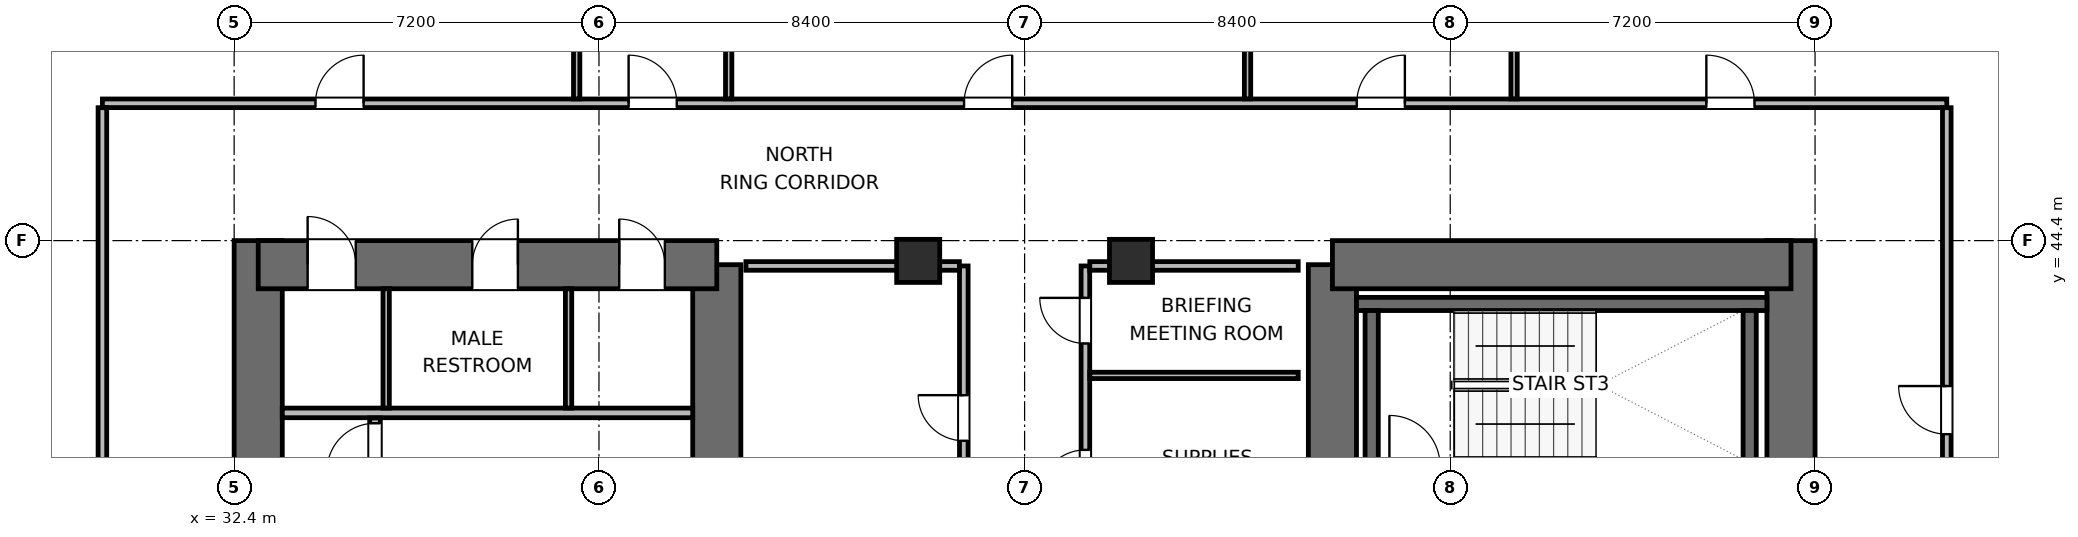
"""IFC4 building model, lengths in metres.
Left out: names, types, materials, properties, quantities, classifications, styles, units other than length and angle.
Written with IfcOpenShell. Run it as: python <this file> out.ifc"""

import sys

from ifc_helpers import new_model, si_unit, direction, frame, frame_2d, origin, origin_2d, place, context, subcontext, project, spatial, rectangle, extrude, element, fill, save


model = new_model("IFC4")
c1 = context("Model", 3, precision=1e-05, world=origin(), true_north=direction((0.0, 1.0)))
c2 = subcontext(c1, "Body", "Model", "MODEL_VIEW")
j1 = project(units=[si_unit("LENGTHUNIT", "METRE"), si_unit("PLANEANGLEUNIT", "RADIAN")], contexts=[c1])
p1 = place(None, origin())
s1 = spatial("IfcSite", under=j1, at=p1, CompositionType="ELEMENT")
p2 = place(p1, origin())
s2 = spatial("IfcBuilding", under=s1, at=p2, CompositionType="ELEMENT")
p3 = place(p2, frame((0.0, 0.0, 45.0)))
s3 = spatial("IfcBuildingStorey", under=s2, at=p3, CompositionType="ELEMENT", Elevation=45.0)
p4 = place(p3, frame((32.875, 27.6, 0.0), z_axis=(0.0, 0.0, 1.0), x_axis=(0.0, 1.0, 0.0)))
e1 = element("IfcWall", 1, at=p4, inside=s3, PredefinedType="SHEAR", context=c2, shape_type="SweptSolid", body=[
    extrude(rectangle(XDim=16.8, YDim=0.95, at=frame_2d((8.4, 0.0))), origin(), (0.0, 0.0, 1.0), 3.9),
])
p5 = place(p3, frame((41.925, 37.8, 0.0), z_axis=(0.0, 0.0, 1.0), x_axis=(0.0, 1.0, 0.0)))
e2 = element("IfcWall", 2, at=p5, inside=s3, PredefinedType="SHEAR", context=c2, shape_type="SweptSolid", body=[
    extrude(rectangle(XDim=6.125, YDim=0.95, at=frame_2d((3.062, 0.0))), origin(), (0.0, 0.0, 1.0), 3.9),
])
p6 = place(p3, frame((32.875, 43.925, 0.0), z_axis=(0.0, 0.0, 1.0), x_axis=(1.0, 0.0, 0.0)))
e3 = element("IfcWall", 3, at=p6, inside=s3, PredefinedType="SHEAR", context=c2, shape_type="SweptSolid", body=[
    extrude(rectangle(XDim=9.05, YDim=0.95, at=frame_2d((4.525, 0.0))), origin(), (0.0, 0.0, 1.0), 3.9),
])
p7 = place(p6, frame((0.975, 0.0, 0.0)))
e4 = element("IfcOpeningElement", 4, at=p7, cuts=e3, PredefinedType="OPENING", context=c2, shape_type="SweptSolid", body=[
    extrude(rectangle(XDim=0.95, YDim=2.04, at=frame_2d((0.475, 1.02))), frame((0.0, 0.485, 0.0), z_axis=(0.0, -1.0, 0.0), x_axis=(1.0, 0.0, 0.0)), (0.0, 0.0, 1.0), 0.97),
])
p8 = place(p6, frame((4.225, 0.0, 0.0)))
e5 = element("IfcOpeningElement", 5, at=p8, cuts=e3, PredefinedType="OPENING", context=c2, shape_type="SweptSolid", body=[
    extrude(rectangle(XDim=0.9, YDim=2.02, at=frame_2d((0.45, 1.01))), frame((0.0, 0.485, 0.0), z_axis=(0.0, -1.0, 0.0), x_axis=(1.0, 0.0, 0.0)), (0.0, 0.0, 1.0), 0.97),
])
p9 = place(p6, frame((7.125, 0.0, 0.0)))
e6 = element("IfcOpeningElement", 6, at=p9, cuts=e3, PredefinedType="OPENING", context=c2, shape_type="SweptSolid", body=[
    extrude(rectangle(XDim=0.9, YDim=2.02, at=frame_2d((0.45, 1.01))), frame((0.0, 0.485, 0.0), z_axis=(0.0, -1.0, 0.0), x_axis=(1.0, 0.0, 0.0)), (0.0, 0.0, 1.0), 0.97),
])
p10 = place(p3, frame((54.075, 38.0, 0.0), z_axis=(0.0, 0.0, 1.0), x_axis=(0.0, 1.0, 0.0)))
e7 = element("IfcWall", 7, at=p10, inside=s3, PredefinedType="SHEAR", context=c2, shape_type="SweptSolid", body=[
    extrude(rectangle(XDim=5.925, YDim=0.95, at=frame_2d((2.962, 0.0))), origin(), (0.0, 0.0, 1.0), 3.9),
])
p11 = place(p3, frame((63.125, 27.6, 0.0), z_axis=(0.0, 0.0, 1.0), x_axis=(0.0, 1.0, 0.0)))
e8 = element("IfcWall", 8, at=p11, inside=s3, PredefinedType="SHEAR", context=c2, shape_type="SweptSolid", body=[
    extrude(rectangle(XDim=16.8, YDim=0.95, at=frame_2d((8.4, 0.0))), origin(), (0.0, 0.0, 1.0), 3.9),
])
p12 = place(p3, frame((54.075, 43.925, 0.0), z_axis=(0.0, 0.0, 1.0), x_axis=(1.0, 0.0, 0.0)))
e9 = element("IfcWall", 9, at=p12, inside=s3, PredefinedType="SHEAR", context=c2, shape_type="SweptSolid", body=[
    extrude(rectangle(XDim=9.05, YDim=0.95, at=frame_2d((4.525, 0.0))), origin(), (0.0, 0.0, 1.0), 3.9),
])
p13 = place(p3, frame((54.55, 43.15, 0.0), z_axis=(0.0, 0.0, 1.0), x_axis=(1.0, 0.0, 0.0)))
e10 = element("IfcWall", 10, at=p13, inside=s3, PredefinedType="SHEAR", context=c2, shape_type="SweptSolid", body=[
    extrude(rectangle(XDim=8.1, YDim=0.26, at=frame_2d((4.05, 0.0))), origin(), (0.0, 0.0, 1.0), 3.9),
])
for number, where, z_axis, x_axis in (
    (11, (54.85, 40.08, 0.0), (0.0, 0.0, 1.0), (0.0, 1.0, 0.0)),
    (12, (62.31, 40.08, 0.0), (0.0, 0.0, 1.0), (0.0, 1.0, 0.0)),
):
    element("IfcWall", number, at=place(p3, frame(where, z_axis=z_axis, x_axis=x_axis)), inside=s3, PredefinedType="SHEAR", context=c2, shape_type="SweptSolid", body=[
        extrude(rectangle(XDim=2.94, YDim=0.26, at=frame_2d((1.47, 0.0))), origin(), (0.0, 0.0, 1.0), 3.9),
    ])
for number, where, z_axis, x_axis in (
    (13, (45.9, 44.0, 0.0), (0.0, 0.0, 1.0), (1.0, 0.0, 0.0)),
    (14, (50.1, 44.0, 0.0), (0.0, 0.0, 1.0), (1.0, 0.0, 0.0)),
):
    element("IfcColumn", number, at=place(p3, frame(where, z_axis=z_axis, x_axis=x_axis)), inside=s3, PredefinedType="COLUMN", context=c2, shape_type="SweptSolid", body=[
        extrude(rectangle(XDim=0.85, YDim=0.85, at=origin_2d()), origin(), (0.0, 0.0, 1.0), 3.9),
    ])
p14 = place(p3, frame((33.35, 41.0, 0.0), z_axis=(0.0, 0.0, 1.0), x_axis=(1.0, 0.0, 0.0)))
e15 = element("IfcWall", 15, at=p14, inside=s3, PredefinedType="PLUMBINGWALL", context=c2, shape_type="SweptSolid", body=[
    extrude(rectangle(XDim=8.1, YDim=0.19, at=frame_2d((4.05, 0.0))), origin(), (0.0, 0.0, 1.0), 3.64),
])
for number, where, z_axis, x_axis in (
    (16, (35.4, 41.095, 0.0), (0.0, 0.0, 1.0), (0.0, 1.0, 0.0)),
    (17, (39.0, 41.095, 0.0), (0.0, 0.0, 1.0), (0.0, 1.0, 0.0)),
):
    element("IfcWall", number, at=place(p3, frame(where, z_axis=z_axis, x_axis=x_axis)), inside=s3, PredefinedType="PARTITIONING", context=c2, shape_type="SweptSolid", body=[
        extrude(rectangle(XDim=2.355, YDim=0.125, at=frame_2d((1.177, 0.0))), origin(), (0.0, 0.0, 1.0), 3.64),
    ])
p15 = place(p3, frame((35.18, 39.74, 0.0), z_axis=(0.0, 0.0, 1.0), x_axis=(0.0, 1.0, 0.0)))
e18 = element("IfcWall", 18, at=p15, inside=s3, PredefinedType="PARTITIONING", context=c2, shape_type="SweptSolid", body=[
    extrude(rectangle(XDim=1.16, YDim=0.21, at=frame_2d((0.58, 0.0))), origin(), (0.0, 0.0, 1.0), 3.64),
])
p16 = place(p15, frame((0.105, 0.0, 0.0)))
e19 = element("IfcOpeningElement", 19, at=p16, cuts=e18, PredefinedType="OPENING", context=c2, shape_type="SweptSolid", body=[
    extrude(rectangle(XDim=0.95, YDim=2.04, at=frame_2d((0.475, 1.02))), frame((0.0, 0.115, 0.0), z_axis=(0.0, -1.0, 0.0), x_axis=(1.0, 0.0, 0.0)), (0.0, 0.0, 1.0), 0.23),
])
p17 = place(p3, frame((46.8, 37.9, 0.0), z_axis=(0.0, 0.0, 1.0), x_axis=(0.0, 1.0, 0.0)))
e20 = element("IfcWall", 20, at=p17, inside=s3, PredefinedType="PARTITIONING", context=c2, shape_type="SweptSolid", body=[
    extrude(rectangle(XDim=6.0, YDim=0.17, at=frame_2d((3.0, 0.0))), origin(), (0.0, 0.0, 1.0), 3.64),
])
p18 = place(p17, frame((2.55, 0.0, 0.0)))
e21 = element("IfcOpeningElement", 21, at=p18, cuts=e20, PredefinedType="OPENING", context=c2, shape_type="SweptSolid", body=[
    extrude(rectangle(XDim=0.9, YDim=2.02, at=frame_2d((0.45, 1.01))), frame((0.0, 0.095, 0.0), z_axis=(0.0, -1.0, 0.0), x_axis=(1.0, 0.0, 0.0)), (0.0, 0.0, 1.0), 0.19),
])
p19 = place(p3, frame((42.5, 43.9, 0.0), z_axis=(0.0, 0.0, 1.0), x_axis=(1.0, 0.0, 0.0)))
e22 = element("IfcWall", 22, at=p19, inside=s3, PredefinedType="PARTITIONING", context=c2, shape_type="SweptSolid", body=[
    extrude(rectangle(XDim=4.213, YDim=0.17, at=frame_2d((2.106, 0.0))), origin(), (0.0, 0.0, 1.0), 2.525),
])
p20 = place(p3, frame((49.2, 37.9, 0.0), z_axis=(0.0, 0.0, 1.0), x_axis=(0.0, 1.0, 0.0)))
e23 = element("IfcWall", 23, at=p20, inside=s3, PredefinedType="PARTITIONING", context=c2, shape_type="SweptSolid", body=[
    extrude(rectangle(XDim=6.0, YDim=0.17, at=frame_2d((3.0, 0.0))), origin(), (0.0, 0.0, 1.0), 3.64),
])
p21 = place(p20, frame((1.47, 0.0, 0.0)))
e24 = element("IfcOpeningElement", 24, at=p21, cuts=e23, PredefinedType="OPENING", context=c2, shape_type="SweptSolid", body=[
    extrude(rectangle(XDim=0.9, YDim=2.02, at=frame_2d((0.45, 1.01))), frame((0.0, 0.095, 0.0), z_axis=(0.0, -1.0, 0.0), x_axis=(1.0, 0.0, 0.0)), (0.0, 0.0, 1.0), 0.19),
])
p22 = place(p20, frame((4.47, 0.0, 0.0)))
e25 = element("IfcOpeningElement", 25, at=p22, cuts=e23, PredefinedType="OPENING", context=c2, shape_type="SweptSolid", body=[
    extrude(rectangle(XDim=0.9, YDim=2.02, at=frame_2d((0.45, 1.01))), frame((0.0, 0.095, 0.0), z_axis=(0.0, -1.0, 0.0), x_axis=(1.0, 0.0, 0.0)), (0.0, 0.0, 1.0), 0.19),
])
p23 = place(p3, frame((49.287, 43.9, 0.0), z_axis=(0.0, 0.0, 1.0), x_axis=(1.0, 0.0, 0.0)))
e26 = element("IfcWall", 26, at=p23, inside=s3, PredefinedType="PARTITIONING", context=c2, shape_type="SweptSolid", body=[
    extrude(rectangle(XDim=4.113, YDim=0.17, at=frame_2d((2.056, 0.0))), origin(), (0.0, 0.0, 1.0), 2.525),
])
p24 = place(p3, frame((49.287, 41.74, 0.0), z_axis=(0.0, 0.0, 1.0), x_axis=(1.0, 0.0, 0.0)))
e27 = element("IfcWall", 27, at=p24, inside=s3, PredefinedType="PARTITIONING", context=c2, shape_type="SweptSolid", body=[
    extrude(rectangle(XDim=4.113, YDim=0.125, at=frame_2d((2.056, 0.0))), origin(), (0.0, 0.0, 1.0), 3.64),
])
p25 = place(p3, frame((29.8, 47.11, 0.0), z_axis=(0.0, 0.0, 1.0), x_axis=(1.0, 0.0, 0.0)))
e28 = element("IfcWall", 28, at=p25, inside=s3, PredefinedType="PARTITIONING", context=c2, shape_type="SweptSolid", body=[
    extrude(rectangle(XDim=36.4, YDim=0.17, at=frame_2d((18.2, 0.0))), origin(), (0.0, 0.0, 1.0), 3.64),
])
p26 = place(p25, frame((4.205, 0.0, 0.0)))
e29 = element("IfcOpeningElement", 29, at=p26, cuts=e28, PredefinedType="OPENING", context=c2, shape_type="SweptSolid", body=[
    extrude(rectangle(XDim=0.95, YDim=2.04, at=frame_2d((0.475, 1.02))), frame((0.0, 0.095, 0.0), z_axis=(0.0, -1.0, 0.0), x_axis=(1.0, 0.0, 0.0)), (0.0, 0.0, 1.0), 0.19),
])
p27 = place(p25, frame((10.385, 0.0, 0.0)))
e30 = element("IfcOpeningElement", 30, at=p27, cuts=e28, PredefinedType="OPENING", context=c2, shape_type="SweptSolid", body=[
    extrude(rectangle(XDim=0.95, YDim=2.04, at=frame_2d((0.475, 1.02))), frame((0.0, 0.095, 0.0), z_axis=(0.0, -1.0, 0.0), x_axis=(1.0, 0.0, 0.0)), (0.0, 0.0, 1.0), 0.19),
])
p28 = place(p25, frame((17.005, 0.0, 0.0)))
e31 = element("IfcOpeningElement", 31, at=p28, cuts=e28, PredefinedType="OPENING", context=c2, shape_type="SweptSolid", body=[
    extrude(rectangle(XDim=0.95, YDim=2.04, at=frame_2d((0.475, 1.02))), frame((0.0, 0.095, 0.0), z_axis=(0.0, -1.0, 0.0), x_axis=(1.0, 0.0, 0.0)), (0.0, 0.0, 1.0), 0.19),
])
p29 = place(p25, frame((24.755, 0.0, 0.0)))
e32 = element("IfcOpeningElement", 32, at=p29, cuts=e28, PredefinedType="OPENING", context=c2, shape_type="SweptSolid", body=[
    extrude(rectangle(XDim=0.95, YDim=2.04, at=frame_2d((0.475, 1.02))), frame((0.0, 0.095, 0.0), z_axis=(0.0, -1.0, 0.0), x_axis=(1.0, 0.0, 0.0)), (0.0, 0.0, 1.0), 0.19),
])
p30 = place(p25, frame((31.655, 0.0, 0.0)))
e33 = element("IfcOpeningElement", 33, at=p30, cuts=e28, PredefinedType="OPENING", context=c2, shape_type="SweptSolid", body=[
    extrude(rectangle(XDim=0.95, YDim=2.04, at=frame_2d((0.475, 1.02))), frame((0.0, 0.095, 0.0), z_axis=(0.0, -1.0, 0.0), x_axis=(1.0, 0.0, 0.0)), (0.0, 0.0, 1.0), 0.19),
])
p31 = place(p3, frame((29.8, 24.977, 0.0), z_axis=(0.0, 0.0, 1.0), x_axis=(0.0, 1.0, 0.0)))
e34 = element("IfcWall", 34, at=p31, inside=s3, PredefinedType="PARTITIONING", context=c2, shape_type="SweptSolid", body=[
    extrude(rectangle(XDim=22.046, YDim=0.17, at=frame_2d((11.023, 0.0))), origin(), (0.0, 0.0, 1.0), 3.64),
])
p32 = place(p31, frame((10.548, 0.0, 0.0)))
e35 = element("IfcOpeningElement", 35, at=p32, cuts=e34, PredefinedType="OPENING", context=c2, shape_type="SweptSolid", body=[
    extrude(rectangle(XDim=0.95, YDim=2.04, at=frame_2d((0.475, 1.02))), frame((0.0, 0.095, 0.0), z_axis=(0.0, -1.0, 0.0), x_axis=(1.0, 0.0, 0.0)), (0.0, 0.0, 1.0), 0.19),
])
p33 = place(p3, frame((66.2, 24.977, 0.0), z_axis=(0.0, 0.0, 1.0), x_axis=(0.0, 1.0, 0.0)))
e36 = element("IfcWall", 36, at=p33, inside=s3, PredefinedType="PARTITIONING", context=c2, shape_type="SweptSolid", body=[
    extrude(rectangle(XDim=22.046, YDim=0.17, at=frame_2d((11.023, 0.0))), origin(), (0.0, 0.0, 1.0), 3.64),
])
p34 = place(p33, frame((4.493, 0.0, 0.0)))
e37 = element("IfcOpeningElement", 37, at=p34, cuts=e36, PredefinedType="OPENING", context=c2, shape_type="SweptSolid", body=[
    extrude(rectangle(XDim=0.95, YDim=2.04, at=frame_2d((0.475, 1.02))), frame((0.0, 0.095, 0.0), z_axis=(0.0, -1.0, 0.0), x_axis=(1.0, 0.0, 0.0)), (0.0, 0.0, 1.0), 0.19),
])
p35 = place(p33, frame((15.603, 0.0, 0.0)))
e38 = element("IfcOpeningElement", 38, at=p35, cuts=e36, PredefinedType="OPENING", context=c2, shape_type="SweptSolid", body=[
    extrude(rectangle(XDim=0.95, YDim=2.04, at=frame_2d((0.475, 1.02))), frame((0.0, 0.095, 0.0), z_axis=(0.0, -1.0, 0.0), x_axis=(1.0, 0.0, 0.0)), (0.0, 0.0, 1.0), 0.19),
])
p36 = place(p3, frame((39.16, 47.197, 0.0), z_axis=(0.0, 0.0, 1.0), x_axis=(0.0, 1.0, 0.0)))
e39 = element("IfcWall", 39, at=p36, inside=s3, PredefinedType="PARTITIONING", context=c2, shape_type="SweptSolid", body=[
    extrude(rectangle(XDim=14.958, YDim=0.125, at=frame_2d((7.479, 0.0))), origin(), (0.0, 0.0, 1.0), 3.64),
])
p37 = place(p3, frame((42.16, 47.197, 0.0), z_axis=(0.0, 0.0, 1.0), x_axis=(0.0, 1.0, 0.0)))
e40 = element("IfcWall", 40, at=p37, inside=s3, PredefinedType="PARTITIONING", context=c2, shape_type="SweptSolid", body=[
    extrude(rectangle(XDim=14.393, YDim=0.125, at=frame_2d((7.197, 0.0))), origin(), (0.0, 0.0, 1.0), 3.003),
])
p38 = place(p3, frame((52.4, 47.197, 0.0), z_axis=(0.0, 0.0, 1.0), x_axis=(0.0, 1.0, 0.0)))
e41 = element("IfcWall", 41, at=p38, inside=s3, PredefinedType="PARTITIONING", context=c2, shape_type="SweptSolid", body=[
    extrude(rectangle(XDim=11.228, YDim=0.125, at=frame_2d((5.614, 0.0))), origin(), (0.0, 0.0, 1.0), 3.003),
])
p39 = place(p3, frame((57.66, 47.197, 0.0), z_axis=(0.0, 0.0, 1.0), x_axis=(0.0, 1.0, 0.0)))
e42 = element("IfcWall", 42, at=p39, inside=s3, PredefinedType="PARTITIONING", context=c2, shape_type="SweptSolid", body=[
    extrude(rectangle(XDim=14.888, YDim=0.125, at=frame_2d((7.444, 0.0))), origin(), (0.0, 0.0, 1.0), 3.64),
])
p40 = place(p7, origin())
e43 = element("IfcDoor", 43, at=p40, inside=s3, OperationType="SINGLE_SWING_LEFT", PredefinedType="DOOR", context=c2, shape_type="SweptSolid", body=[
    extrude(rectangle(XDim=0.95, YDim=2.04, at=frame_2d((0.475, 1.02))), frame((0.0, 0.025, 0.0), z_axis=(0.0, -1.0, 0.0), x_axis=(1.0, 0.0, 0.0)), (0.0, 0.0, 1.0), 0.05),
])
fill(e4, e43)
p41 = place(p8, origin())
e44 = element("IfcDoor", 44, at=p41, inside=s3, OperationType="SINGLE_SWING_RIGHT", PredefinedType="DOOR", context=c2, shape_type="SweptSolid", body=[
    extrude(rectangle(XDim=0.9, YDim=2.02, at=frame_2d((0.45, 1.01))), frame((0.0, 0.025, 0.0), z_axis=(0.0, -1.0, 0.0), x_axis=(1.0, 0.0, 0.0)), (0.0, 0.0, 1.0), 0.05),
])
fill(e5, e44)
p42 = place(p9, origin())
e45 = element("IfcDoor", 45, at=p42, inside=s3, OperationType="SINGLE_SWING_LEFT", PredefinedType="DOOR", context=c2, shape_type="SweptSolid", body=[
    extrude(rectangle(XDim=0.9, YDim=2.02, at=frame_2d((0.45, 1.01))), frame((0.0, 0.025, 0.0), z_axis=(0.0, -1.0, 0.0), x_axis=(1.0, 0.0, 0.0)), (0.0, 0.0, 1.0), 0.05),
])
fill(e6, e45)
p43 = place(p16, origin())
e46 = element("IfcDoor", 46, at=p43, inside=s3, OperationType="SINGLE_SWING_LEFT", PredefinedType="DOOR", context=c2, shape_type="SweptSolid", body=[
    extrude(rectangle(XDim=0.95, YDim=2.04, at=frame_2d((0.475, 1.02))), frame((0.0, 0.025, 0.0), z_axis=(0.0, -1.0, 0.0), x_axis=(1.0, 0.0, 0.0)), (0.0, 0.0, 1.0), 0.05),
])
fill(e19, e46)
p44 = place(p18, origin())
e47 = element("IfcDoor", 47, at=p44, inside=s3, OperationType="SINGLE_SWING_RIGHT", PredefinedType="DOOR", context=c2, shape_type="SweptSolid", body=[
    extrude(rectangle(XDim=0.9, YDim=2.02, at=frame_2d((0.45, 1.01))), frame((0.0, 0.025, 0.0), z_axis=(0.0, -1.0, 0.0), x_axis=(1.0, 0.0, 0.0)), (0.0, 0.0, 1.0), 0.05),
])
fill(e21, e47)
p45 = place(p21, origin())
e48 = element("IfcDoor", 48, at=p45, inside=s3, OperationType="SINGLE_SWING_LEFT", PredefinedType="DOOR", context=c2, shape_type="SweptSolid", body=[
    extrude(rectangle(XDim=0.9, YDim=2.02, at=frame_2d((0.45, 1.01))), frame((0.0, 0.025, 0.0), z_axis=(0.0, -1.0, 0.0), x_axis=(1.0, 0.0, 0.0)), (0.0, 0.0, 1.0), 0.05),
])
fill(e24, e48)
p46 = place(p22, origin())
e49 = element("IfcDoor", 49, at=p46, inside=s3, OperationType="SINGLE_SWING_RIGHT", PredefinedType="DOOR", context=c2, shape_type="SweptSolid", body=[
    extrude(rectangle(XDim=0.9, YDim=2.02, at=frame_2d((0.45, 1.01))), frame((0.0, 0.025, 0.0), z_axis=(0.0, -1.0, 0.0), x_axis=(1.0, 0.0, 0.0)), (0.0, 0.0, 1.0), 0.05),
])
fill(e25, e49)
p47 = place(p26, origin())
e50 = element("IfcDoor", 50, at=p47, inside=s3, OperationType="SINGLE_SWING_RIGHT", PredefinedType="DOOR", context=c2, shape_type="SweptSolid", body=[
    extrude(rectangle(XDim=0.95, YDim=2.04, at=frame_2d((0.475, 1.02))), frame((0.0, 0.025, 0.0), z_axis=(0.0, -1.0, 0.0), x_axis=(1.0, 0.0, 0.0)), (0.0, 0.0, 1.0), 0.05),
])
fill(e29, e50)
p48 = place(p27, origin())
e51 = element("IfcDoor", 51, at=p48, inside=s3, OperationType="SINGLE_SWING_LEFT", PredefinedType="DOOR", context=c2, shape_type="SweptSolid", body=[
    extrude(rectangle(XDim=0.95, YDim=2.04, at=frame_2d((0.475, 1.02))), frame((0.0, 0.025, 0.0), z_axis=(0.0, -1.0, 0.0), x_axis=(1.0, 0.0, 0.0)), (0.0, 0.0, 1.0), 0.05),
])
fill(e30, e51)
p49 = place(p28, origin())
e52 = element("IfcDoor", 52, at=p49, inside=s3, OperationType="SINGLE_SWING_RIGHT", PredefinedType="DOOR", context=c2, shape_type="SweptSolid", body=[
    extrude(rectangle(XDim=0.95, YDim=2.04, at=frame_2d((0.475, 1.02))), frame((0.0, 0.025, 0.0), z_axis=(0.0, -1.0, 0.0), x_axis=(1.0, 0.0, 0.0)), (0.0, 0.0, 1.0), 0.05),
])
fill(e31, e52)
p50 = place(p29, origin())
e53 = element("IfcDoor", 53, at=p50, inside=s3, OperationType="SINGLE_SWING_RIGHT", PredefinedType="DOOR", context=c2, shape_type="SweptSolid", body=[
    extrude(rectangle(XDim=0.95, YDim=2.04, at=frame_2d((0.475, 1.02))), frame((0.0, 0.025, 0.0), z_axis=(0.0, -1.0, 0.0), x_axis=(1.0, 0.0, 0.0)), (0.0, 0.0, 1.0), 0.05),
])
fill(e32, e53)
p51 = place(p30, origin())
e54 = element("IfcDoor", 54, at=p51, inside=s3, OperationType="SINGLE_SWING_LEFT", PredefinedType="DOOR", context=c2, shape_type="SweptSolid", body=[
    extrude(rectangle(XDim=0.95, YDim=2.04, at=frame_2d((0.475, 1.02))), frame((0.0, 0.025, 0.0), z_axis=(0.0, -1.0, 0.0), x_axis=(1.0, 0.0, 0.0)), (0.0, 0.0, 1.0), 0.05),
])
fill(e33, e54)
p52 = place(p35, origin())
e55 = element("IfcDoor", 55, at=p52, inside=s3, OperationType="SINGLE_SWING_RIGHT", PredefinedType="DOOR", context=c2, shape_type="SweptSolid", body=[
    extrude(rectangle(XDim=0.95, YDim=2.04, at=frame_2d((0.475, 1.02))), frame((0.0, 0.025, 0.0), z_axis=(0.0, -1.0, 0.0), x_axis=(1.0, 0.0, 0.0)), (0.0, 0.0, 1.0), 0.05),
])
fill(e38, e55)
save(model, sys.argv[1])
